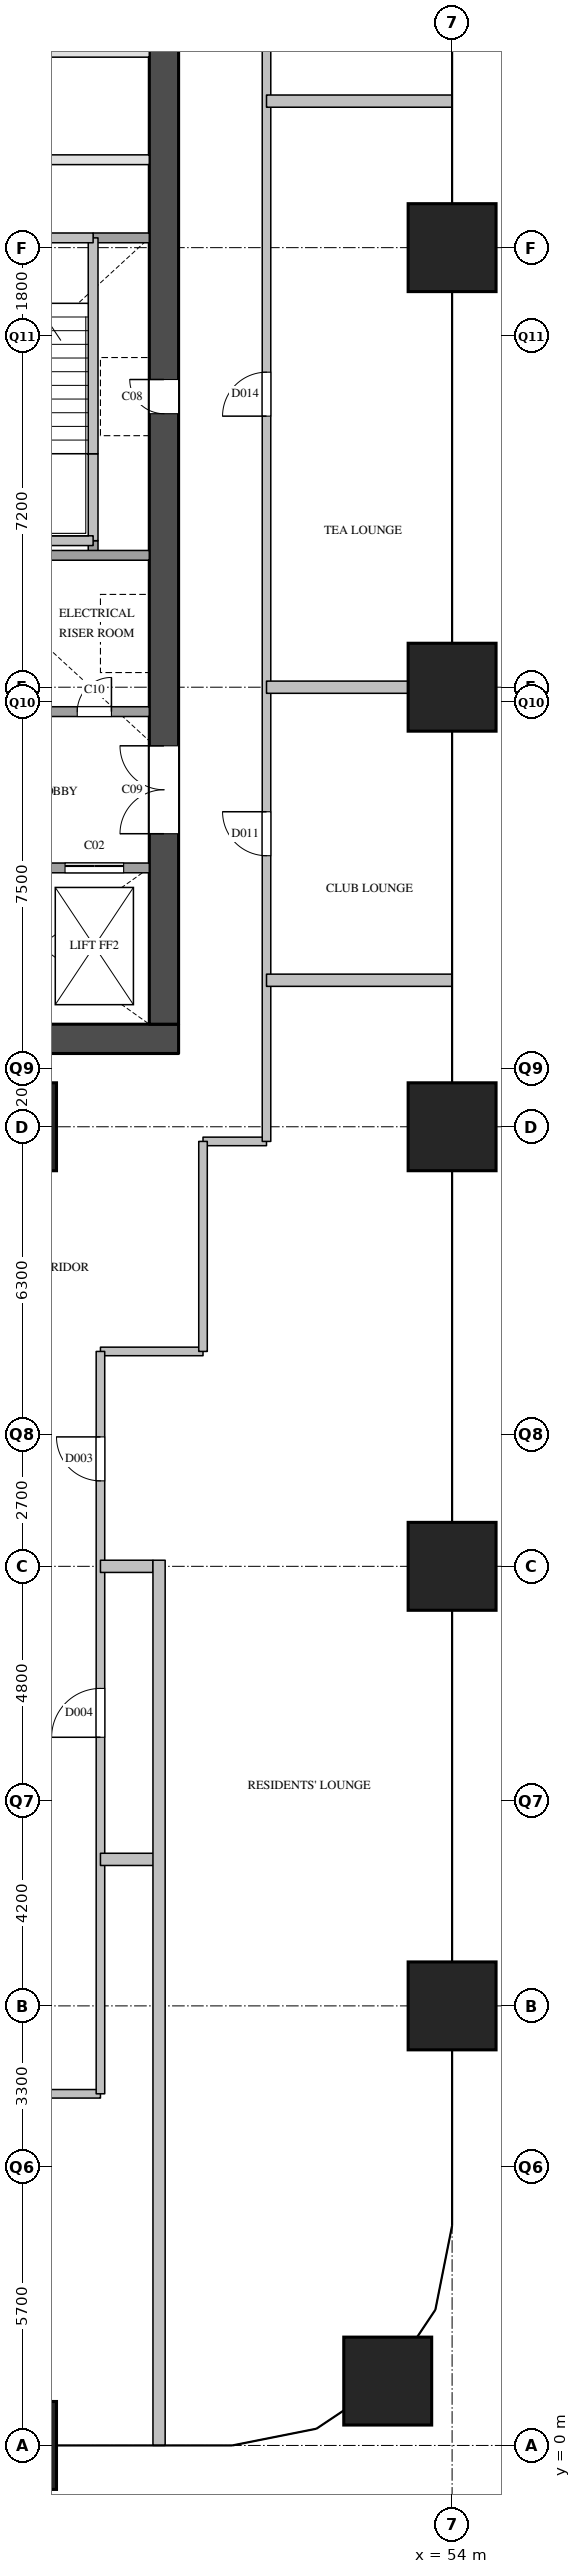
"""IFC4 building model, lengths in metres.
Left out: names, types, materials, properties, quantities, classifications, styles, units other than length and angle.
Written with IfcOpenShell. Run it as: python <this file> out.ifc"""

import sys

from ifc_helpers import new_model, si_unit, direction, frame, frame_2d, origin, origin_2d, place, context, subcontext, project, spatial, rectangle, extrude, element, fill, save


model = new_model("IFC4")
c1 = context("Model", 3, precision=1e-05, world=origin(), true_north=direction((0.0, 1.0)))
c2 = subcontext(c1, "Body", "Model", "MODEL_VIEW")
j1 = project(units=[si_unit("LENGTHUNIT", "METRE"), si_unit("PLANEANGLEUNIT", "RADIAN")], contexts=[c1])
p1 = place(None, origin())
s1 = spatial("IfcSite", under=j1, at=p1, CompositionType="ELEMENT")
p2 = place(p1, origin())
s2 = spatial("IfcBuilding", under=s1, at=p2, CompositionType="ELEMENT")
p3 = place(p2, frame((0.0, 0.0, 115.8)))
s3 = spatial("IfcBuildingStorey", under=s2, at=p3, CompositionType="ELEMENT", Elevation=115.8)
for number, where, z_axis, x_axis in (
    (1, (45.0, 0.0, 0.0), (0.0, 0.0, 1.0), (1.0, 0.0, 0.0)),
    (2, (45.0, 27.0, 0.0), (0.0, 0.0, 1.0), (1.0, 0.0, 0.0)),
    (3, (52.682, 1.318, 0.0), (0.0, 0.0, 1.0), (1.0, 0.0, 0.0)),
    (4, (54.0, 9.0, 0.0), (0.0, 0.0, 1.0), (1.0, 0.0, 0.0)),
    (5, (54.0, 18.0, 0.0), (0.0, 0.0, 1.0), (1.0, 0.0, 0.0)),
    (6, (54.0, 27.0, 0.0), (0.0, 0.0, 1.0), (1.0, 0.0, 0.0)),
    (7, (54.0, 36.0, 0.0), (0.0, 0.0, 1.0), (1.0, 0.0, 0.0)),
    (8, (54.0, 45.0, 0.0), (0.0, 0.0, 1.0), (1.0, 0.0, 0.0)),
):
    element("IfcColumn", number, at=place(p3, frame(where, z_axis=z_axis, x_axis=x_axis)), inside=s3, PredefinedType="COLUMN", context=c2, shape_type="SweptSolid", body=[
        extrude(rectangle(XDim=1.8, YDim=1.8, at=origin_2d()), origin(), (0.0, 0.0, 1.0), 3.8),
    ])
p4 = place(p3, frame((36.0, 28.8, 0.0), z_axis=(0.0, 0.0, 1.0), x_axis=(1.0, 0.0, 0.0)))
e9 = element("IfcWall", 9, at=p4, inside=s3, PredefinedType="SHEAR", context=c2, shape_type="SweptSolid", body=[
    extrude(rectangle(XDim=12.4, YDim=0.6, at=frame_2d((6.2, 0.0))), origin(), (0.0, 0.0, 1.0), 3.5),
])
p5 = place(p3, frame((48.1, 29.1, 0.0), z_axis=(0.0, 0.0, 1.0), x_axis=(0.0, 1.0, 0.0)))
e10 = element("IfcWall", 10, at=p5, inside=s3, PredefinedType="SHEAR", context=c2, shape_type="SweptSolid", body=[
    extrude(rectangle(XDim=20.3, YDim=0.6, at=frame_2d((10.15, 0.0))), origin(), (0.0, 0.0, 1.0), 3.5),
])
p6 = place(p5, frame((12.5, 0.0, 0.0)))
e11 = element("IfcOpeningElement", 11, at=p6, cuts=e10, PredefinedType="OPENING", context=c2, shape_type="SweptSolid", body=[
    extrude(rectangle(XDim=0.7, YDim=2.1, at=frame_2d((0.35, 1.05))), frame((0.0, 0.31, 0.0), z_axis=(0.0, -1.0, 0.0), x_axis=(1.0, 0.0, 0.0)), (0.0, 0.0, 1.0), 0.62),
])
p7 = place(p5, frame((3.9, 0.0, 0.0)))
e12 = element("IfcOpeningElement", 12, at=p7, cuts=e10, PredefinedType="OPENING", context=c2, shape_type="SweptSolid", body=[
    extrude(rectangle(XDim=1.8, YDim=2.1, at=frame_2d((0.9, 1.05))), frame((0.0, 0.31, 0.0), z_axis=(0.0, -1.0, 0.0), x_axis=(1.0, 0.0, 0.0)), (0.0, 0.0, 1.0), 0.62),
])
p8 = place(p3, frame((46.65, 38.7, 0.0), z_axis=(0.0, 0.0, 1.0), x_axis=(0.0, 1.0, 0.0)))
e13 = element("IfcWall", 13, at=p8, inside=s3, PredefinedType="SOLIDWALL", context=c2, shape_type="SweptSolid", body=[
    extrude(rectangle(XDim=0.3, YDim=0.2, at=frame_2d((0.15, 0.0))), origin(), (0.0, 0.0, 1.0), 3.5),
])
p9 = place(p3, frame((46.65, 39.0, 0.0), z_axis=(0.0, 0.0, 1.0), x_axis=(0.0, 1.0, 0.0)))
e14 = element("IfcWall", 14, at=p9, inside=s3, PredefinedType="SOLIDWALL", context=c2, shape_type="SweptSolid", body=[
    extrude(rectangle(XDim=1.78, YDim=0.2, at=frame_2d((0.89, 0.0))), origin(), (0.0, 0.0, 1.0), 3.5),
])
p10 = place(p3, frame((46.65, 40.78, 0.0), z_axis=(0.0, 0.0, 1.0), x_axis=(0.0, 1.0, 0.0)))
e15 = element("IfcWall", 15, at=p10, inside=s3, PredefinedType="SOLIDWALL", context=c2, shape_type="SweptSolid", body=[
    extrude(rectangle(XDim=4.42, YDim=0.2, at=frame_2d((2.21, 0.0))), origin(), (0.0, 0.0, 1.0), 3.5),
])
p11 = place(p3, frame((36.6, 32.3, 0.0), z_axis=(0.0, 0.0, 1.0), x_axis=(1.0, 0.0, 0.0)))
e16 = element("IfcWall", 16, at=p11, inside=s3, PredefinedType="SOLIDWALL", context=c2, shape_type="SweptSolid", body=[
    extrude(rectangle(XDim=11.2, YDim=0.2, at=frame_2d((5.6, 0.0))), origin(), (0.0, 0.0, 1.0), 3.5),
])
p12 = place(p11, frame((7.225, 0.0, 0.0)))
e17 = element("IfcOpeningElement", 17, at=p12, cuts=e16, PredefinedType="OPENING", context=c2, shape_type="SweptSolid", body=[
    extrude(rectangle(XDim=1.2, YDim=2.1, at=frame_2d((0.6, 1.05))), frame((0.0, 0.11, 0.0), z_axis=(0.0, -1.0, 0.0), x_axis=(1.0, 0.0, 0.0)), (0.0, 0.0, 1.0), 0.22),
])
p13 = place(p11, frame((9.475, 0.0, 0.0)))
e18 = element("IfcOpeningElement", 18, at=p13, cuts=e16, PredefinedType="OPENING", context=c2, shape_type="SweptSolid", body=[
    extrude(rectangle(XDim=1.2, YDim=2.1, at=frame_2d((0.6, 1.05))), frame((0.0, 0.11, 0.0), z_axis=(0.0, -1.0, 0.0), x_axis=(1.0, 0.0, 0.0)), (0.0, 0.0, 1.0), 0.22),
])
p14 = place(p3, frame((43.3, 35.5, 0.0), z_axis=(0.0, 0.0, 1.0), x_axis=(1.0, 0.0, 0.0)))
e19 = element("IfcWall", 19, at=p14, inside=s3, PredefinedType="SOLIDWALL", context=c2, shape_type="SweptSolid", body=[
    extrude(rectangle(XDim=4.5, YDim=0.2, at=frame_2d((2.25, 0.0))), origin(), (0.0, 0.0, 1.0), 3.5),
])
p15 = place(p14, frame((0.525, 0.0, 0.0)))
e20 = element("IfcOpeningElement", 20, at=p15, cuts=e19, PredefinedType="OPENING", context=c2, shape_type="SweptSolid", body=[
    extrude(rectangle(XDim=1.2, YDim=2.1, at=frame_2d((0.6, 1.05))), frame((0.0, 0.11, 0.0), z_axis=(0.0, -1.0, 0.0), x_axis=(1.0, 0.0, 0.0)), (0.0, 0.0, 1.0), 0.22),
])
p16 = place(p14, frame((3.025, 0.0, 0.0)))
e21 = element("IfcOpeningElement", 21, at=p16, cuts=e19, PredefinedType="OPENING", context=c2, shape_type="SweptSolid", body=[
    extrude(rectangle(XDim=0.7, YDim=2.1, at=frame_2d((0.35, 1.05))), frame((0.0, 0.11, 0.0), z_axis=(0.0, -1.0, 0.0), x_axis=(1.0, 0.0, 0.0)), (0.0, 0.0, 1.0), 0.22),
])
p17 = place(p3, frame((43.3, 38.7, 0.0), z_axis=(0.0, 0.0, 1.0), x_axis=(1.0, 0.0, 0.0)))
e22 = element("IfcWall", 22, at=p17, inside=s3, PredefinedType="SOLIDWALL", context=c2, shape_type="SweptSolid", body=[
    extrude(rectangle(XDim=4.5, YDim=0.2, at=frame_2d((2.25, 0.0))), origin(), (0.0, 0.0, 1.0), 3.5),
])
p18 = place(p3, frame((43.4, 39.0, 0.0), z_axis=(0.0, 0.0, 1.0), x_axis=(1.0, 0.0, 0.0)))
e23 = element("IfcWall", 23, at=p18, inside=s3, PredefinedType="SOLIDWALL", context=c2, shape_type="SweptSolid", body=[
    extrude(rectangle(XDim=3.25, YDim=0.2, at=frame_2d((1.625, 0.0))), origin(), (0.0, 0.0, 1.0), 3.5),
])
p19 = place(p3, frame((46.65, 45.2, 0.0), z_axis=(0.0, 0.0, 1.0), x_axis=(1.0, 0.0, 0.0)))
e24 = element("IfcWall", 24, at=p19, inside=s3, PredefinedType="SOLIDWALL", context=c2, shape_type="SweptSolid", body=[
    extrude(rectangle(XDim=1.15, YDim=0.2, at=frame_2d((0.575, 0.0))), origin(), (0.0, 0.0, 1.0), 3.5),
])
p20 = place(p3, frame((36.6, 45.2, 0.0), z_axis=(0.0, 0.0, 1.0), x_axis=(1.0, 0.0, 0.0)))
e25 = element("IfcWall", 25, at=p20, inside=s3, PredefinedType="SOLIDWALL", context=c2, shape_type="SweptSolid", body=[
    extrude(rectangle(XDim=10.05, YDim=0.2, at=frame_2d((5.025, 0.0))), origin(), (0.0, 0.0, 1.0), 3.5),
])
p21 = place(p20, frame((1.125, 0.0, 0.0)))
e26 = element("IfcOpeningElement", 26, at=p21, cuts=e25, PredefinedType="OPENING", context=c2, shape_type="SweptSolid", body=[
    extrude(rectangle(XDim=1.1, YDim=2.1, at=frame_2d((0.55, 1.05))), frame((0.0, 0.11, 0.0), z_axis=(0.0, -1.0, 0.0), x_axis=(1.0, 0.0, 0.0)), (0.0, 0.0, 1.0), 0.22),
])
p22 = place(p20, frame((4.475, 0.0, 0.0)))
e27 = element("IfcOpeningElement", 27, at=p22, cuts=e25, PredefinedType="OPENING", context=c2, shape_type="SweptSolid", body=[
    extrude(rectangle(XDim=1.1, YDim=2.1, at=frame_2d((0.55, 1.05))), frame((0.0, 0.11, 0.0), z_axis=(0.0, -1.0, 0.0), x_axis=(1.0, 0.0, 0.0)), (0.0, 0.0, 1.0), 0.22),
])
p23 = place(p20, frame((7.825, 0.0, 0.0)))
e28 = element("IfcOpeningElement", 28, at=p23, cuts=e25, PredefinedType="OPENING", context=c2, shape_type="SweptSolid", body=[
    extrude(rectangle(XDim=1.1, YDim=2.1, at=frame_2d((0.55, 1.05))), frame((0.0, 0.11, 0.0), z_axis=(0.0, -1.0, 0.0), x_axis=(1.0, 0.0, 0.0)), (0.0, 0.0, 1.0), 0.22),
])
p24 = place(p3, frame((36.6, 46.8, 0.0), z_axis=(0.0, 0.0, 1.0), x_axis=(1.0, 0.0, 0.0)))
e29 = element("IfcWall", 29, at=p24, inside=s3, PredefinedType="PARTITIONING", context=c2, shape_type="SweptSolid", body=[
    extrude(rectangle(XDim=11.2, YDim=0.2, at=frame_2d((5.6, 0.0))), origin(), (0.0, 0.0, 1.0), 3.5),
])
p25 = place(p24, frame((2.35, 0.0, 0.0)))
e30 = element("IfcOpeningElement", 30, at=p25, cuts=e29, PredefinedType="OPENING", context=c2, shape_type="SweptSolid", body=[
    extrude(rectangle(XDim=0.9, YDim=2.1, at=frame_2d((0.45, 1.05))), frame((0.0, 0.11, 0.0), z_axis=(0.0, -1.0, 0.0), x_axis=(1.0, 0.0, 0.0)), (0.0, 0.0, 1.0), 0.22),
])
p26 = place(p24, frame((7.95, 0.0, 0.0)))
e31 = element("IfcOpeningElement", 31, at=p26, cuts=e29, PredefinedType="OPENING", context=c2, shape_type="SweptSolid", body=[
    extrude(rectangle(XDim=0.9, YDim=2.1, at=frame_2d((0.45, 1.05))), frame((0.0, 0.11, 0.0), z_axis=(0.0, -1.0, 0.0), x_axis=(1.0, 0.0, 0.0)), (0.0, 0.0, 1.0), 0.22),
])
p27 = place(p3, frame((36.6, 49.0, 0.0), z_axis=(0.0, 0.0, 1.0), x_axis=(1.0, 0.0, 0.0)))
e32 = element("IfcWall", 32, at=p27, inside=s3, PredefinedType="PARTITIONING", context=c2, shape_type="SweptSolid", body=[
    extrude(rectangle(XDim=11.2, YDim=0.2, at=frame_2d((5.6, 0.0))), origin(), (0.0, 0.0, 1.0), 3.5),
])
p28 = place(p3, frame((34.2, 7.2, 0.0), z_axis=(0.0, 0.0, 1.0), x_axis=(1.0, 0.0, 0.0)))
e33 = element("IfcWall", 33, at=p28, inside=s3, PredefinedType="PARTITIONING", context=c2, shape_type="SweptSolid", body=[
    extrude(rectangle(XDim=12.6, YDim=0.175, at=frame_2d((6.3, 0.0))), origin(), (0.0, 0.0, 1.0), 3.5),
])
p29 = place(p28, frame((6.75, 0.0, 0.0)))
e34 = element("IfcOpeningElement", 34, at=p29, cuts=e33, PredefinedType="OPENING", context=c2, shape_type="SweptSolid", body=[
    extrude(rectangle(XDim=0.9, YDim=2.1, at=frame_2d((0.45, 1.05))), frame((0.0, 0.097, 0.0), z_axis=(0.0, -1.0, 0.0), x_axis=(1.0, 0.0, 0.0)), (0.0, 0.0, 1.0), 0.195),
])
p30 = place(p3, frame((46.8, 22.4, 0.0), z_axis=(0.0, 0.0, 1.0), x_axis=(1.0, 0.0, 0.0)))
e35 = element("IfcWall", 35, at=p30, inside=s3, PredefinedType="PARTITIONING", context=c2, shape_type="SweptSolid", body=[
    extrude(rectangle(XDim=2.1, YDim=0.175, at=frame_2d((1.05, 0.0))), origin(), (0.0, 0.0, 1.0), 3.5),
])
p31 = place(p3, frame((48.9, 26.7, 0.0), z_axis=(0.0, 0.0, 1.0), x_axis=(1.0, 0.0, 0.0)))
e36 = element("IfcWall", 36, at=p31, inside=s3, PredefinedType="PARTITIONING", context=c2, shape_type="SweptSolid", body=[
    extrude(rectangle(XDim=1.3, YDim=0.175, at=frame_2d((0.65, 0.0))), origin(), (0.0, 0.0, 1.0), 2.5),
])
p32 = place(p3, frame((46.8, 7.2, 0.0), z_axis=(0.0, 0.0, 1.0), x_axis=(0.0, 1.0, 0.0)))
e37 = element("IfcWall", 37, at=p32, inside=s3, PredefinedType="PARTITIONING", context=c2, shape_type="SweptSolid", body=[
    extrude(rectangle(XDim=15.2, YDim=0.175, at=frame_2d((7.6, 0.0))), origin(), (0.0, 0.0, 1.0), 3.5),
])
p33 = place(p32, frame((12.55, 0.0, 0.0)))
e38 = element("IfcOpeningElement", 38, at=p33, cuts=e37, PredefinedType="OPENING", context=c2, shape_type="SweptSolid", body=[
    extrude(rectangle(XDim=0.9, YDim=2.1, at=frame_2d((0.45, 1.05))), frame((0.0, 0.097, 0.0), z_axis=(0.0, -1.0, 0.0), x_axis=(1.0, 0.0, 0.0)), (0.0, 0.0, 1.0), 0.195),
])
p34 = place(p32, frame((7.3, 0.0, 0.0)))
e39 = element("IfcOpeningElement", 39, at=p34, cuts=e37, PredefinedType="OPENING", context=c2, shape_type="SweptSolid", body=[
    extrude(rectangle(XDim=1.0, YDim=2.1, at=frame_2d((0.5, 1.05))), frame((0.0, 0.097, 0.0), z_axis=(0.0, -1.0, 0.0), x_axis=(1.0, 0.0, 0.0)), (0.0, 0.0, 1.0), 0.195),
])
p35 = place(p3, frame((48.9, 22.4, 0.0), z_axis=(0.0, 0.0, 1.0), x_axis=(0.0, 1.0, 0.0)))
e40 = element("IfcWall", 40, at=p35, inside=s3, PredefinedType="PARTITIONING", context=c2, shape_type="SweptSolid", body=[
    extrude(rectangle(XDim=4.3, YDim=0.175, at=frame_2d((2.15, 0.0))), origin(), (0.0, 0.0, 1.0), 2.5),
])
p36 = place(p3, frame((50.2, 26.7, 0.0), z_axis=(0.0, 0.0, 1.0), x_axis=(0.0, 1.0, 0.0)))
e41 = element("IfcWall", 41, at=p36, inside=s3, PredefinedType="PARTITIONING", context=c2, shape_type="SweptSolid", body=[
    extrude(rectangle(XDim=25.1, YDim=0.175, at=frame_2d((12.55, 0.0))), origin(), (0.0, 0.0, 1.0), 2.5),
])
p37 = place(p36, frame((5.85, 0.0, 0.0)))
e42 = element("IfcOpeningElement", 42, at=p37, cuts=e41, PredefinedType="OPENING", context=c2, shape_type="SweptSolid", body=[
    extrude(rectangle(XDim=0.9, YDim=2.1, at=frame_2d((0.45, 1.05))), frame((0.0, 0.097, 0.0), z_axis=(0.0, -1.0, 0.0), x_axis=(1.0, 0.0, 0.0)), (0.0, 0.0, 1.0), 0.195),
])
p38 = place(p36, frame((14.85, 0.0, 0.0)))
e43 = element("IfcOpeningElement", 43, at=p38, cuts=e41, PredefinedType="OPENING", context=c2, shape_type="SweptSolid", body=[
    extrude(rectangle(XDim=0.9, YDim=2.1, at=frame_2d((0.45, 1.05))), frame((0.0, 0.097, 0.0), z_axis=(0.0, -1.0, 0.0), x_axis=(1.0, 0.0, 0.0)), (0.0, 0.0, 1.0), 0.195),
])
p39 = place(p36, frame((22.75, 0.0, 0.0)))
e44 = element("IfcOpeningElement", 44, at=p39, cuts=e41, PredefinedType="OPENING", context=c2, shape_type="SweptSolid", body=[
    extrude(rectangle(XDim=0.9, YDim=2.1, at=frame_2d((0.45, 1.05))), frame((0.0, 0.097, 0.0), z_axis=(0.0, -1.0, 0.0), x_axis=(1.0, 0.0, 0.0)), (0.0, 0.0, 1.0), 0.195),
])
p40 = place(p3, frame((46.8, 12.0, 0.0), z_axis=(0.0, 0.0, 1.0), x_axis=(1.0, 0.0, 0.0)))
e45 = element("IfcWall", 45, at=p40, inside=s3, PredefinedType="PARTITIONING", context=c2, shape_type="SweptSolid", body=[
    extrude(rectangle(XDim=1.2, YDim=0.25, at=frame_2d((0.6, 0.0))), origin(), (0.0, 0.0, 1.0), 3.5),
])
p41 = place(p3, frame((46.8, 18.0, 0.0), z_axis=(0.0, 0.0, 1.0), x_axis=(1.0, 0.0, 0.0)))
e46 = element("IfcWall", 46, at=p41, inside=s3, PredefinedType="PARTITIONING", context=c2, shape_type="SweptSolid", body=[
    extrude(rectangle(XDim=1.075, YDim=0.25, at=frame_2d((0.538, 0.0))), origin(), (0.0, 0.0, 1.0), 3.5),
])
p42 = place(p3, frame((50.2, 30.0, 0.0), z_axis=(0.0, 0.0, 1.0), x_axis=(1.0, 0.0, 0.0)))
e47 = element("IfcWall", 47, at=p42, inside=s3, PredefinedType="PARTITIONING", context=c2, shape_type="SweptSolid", body=[
    extrude(rectangle(XDim=3.8, YDim=0.25, at=frame_2d((1.9, 0.0))), origin(), (0.0, 0.0, 1.0), 2.5),
])
p43 = place(p3, frame((50.2, 36.0, 0.0), z_axis=(0.0, 0.0, 1.0), x_axis=(1.0, 0.0, 0.0)))
e48 = element("IfcWall", 48, at=p43, inside=s3, PredefinedType="PARTITIONING", context=c2, shape_type="SweptSolid", body=[
    extrude(rectangle(XDim=3.8, YDim=0.25, at=frame_2d((1.9, 0.0))), origin(), (0.0, 0.0, 1.0), 3.5),
])
p44 = place(p3, frame((50.2, 48.0, 0.0), z_axis=(0.0, 0.0, 1.0), x_axis=(1.0, 0.0, 0.0)))
e49 = element("IfcWall", 49, at=p44, inside=s3, PredefinedType="PARTITIONING", context=c2, shape_type="SweptSolid", body=[
    extrude(rectangle(XDim=3.8, YDim=0.25, at=frame_2d((1.9, 0.0))), origin(), (0.0, 0.0, 1.0), 2.5),
])
p45 = place(p3, frame((48.0, 0.0, 0.0), z_axis=(0.0, 0.0, 1.0), x_axis=(0.0, 1.0, 0.0)))
e50 = element("IfcWall", 50, at=p45, inside=s3, PredefinedType="PARTITIONING", context=c2, shape_type="SweptSolid", body=[
    extrude(rectangle(XDim=18.125, YDim=0.25, at=frame_2d((9.062, 0.0))), origin(), (0.0, 0.0, 1.0), 2.5),
])
p46 = place(p13, origin())
e51 = element("IfcDoor", 51, at=p46, inside=s3, OperationType="SLIDING_TO_LEFT", PredefinedType="DOOR", context=c2, shape_type="SweptSolid", body=[
    extrude(rectangle(XDim=1.2, YDim=2.1, at=frame_2d((0.6, 1.05))), frame((0.0, 0.025, 0.0), z_axis=(0.0, -1.0, 0.0), x_axis=(1.0, 0.0, 0.0)), (0.0, 0.0, 1.0), 0.05),
])
fill(e18, e51)
p47 = place(p6, origin())
e52 = element("IfcDoor", 52, at=p47, inside=s3, OperationType="SINGLE_SWING_RIGHT", PredefinedType="DOOR", context=c2, shape_type="SweptSolid", body=[
    extrude(rectangle(XDim=0.7, YDim=2.1, at=frame_2d((0.35, 1.05))), frame((0.0, 0.025, 0.0), z_axis=(0.0, -1.0, 0.0), x_axis=(1.0, 0.0, 0.0)), (0.0, 0.0, 1.0), 0.05),
])
fill(e11, e52)
p48 = place(p7, origin())
e53 = element("IfcDoor", 53, at=p48, inside=s3, OperationType="DOUBLE_DOOR_SINGLE_SWING", PredefinedType="DOOR", context=c2, shape_type="SweptSolid", body=[
    extrude(rectangle(XDim=1.8, YDim=2.1, at=frame_2d((0.9, 1.05))), frame((0.0, 0.025, 0.0), z_axis=(0.0, -1.0, 0.0), x_axis=(1.0, 0.0, 0.0)), (0.0, 0.0, 1.0), 0.05),
])
fill(e12, e53)
p49 = place(p16, origin())
e54 = element("IfcDoor", 54, at=p49, inside=s3, OperationType="SINGLE_SWING_RIGHT", PredefinedType="DOOR", context=c2, shape_type="SweptSolid", body=[
    extrude(rectangle(XDim=0.7, YDim=2.1, at=frame_2d((0.35, 1.05))), frame((0.0, 0.025, 0.0), z_axis=(0.0, -1.0, 0.0), x_axis=(1.0, 0.0, 0.0)), (0.0, 0.0, 1.0), 0.05),
])
fill(e21, e54)
p50 = place(p33, origin())
e55 = element("IfcDoor", 55, at=p50, inside=s3, OperationType="SINGLE_SWING_RIGHT", PredefinedType="DOOR", context=c2, shape_type="SweptSolid", body=[
    extrude(rectangle(XDim=0.9, YDim=2.1, at=frame_2d((0.45, 1.05))), frame((0.0, 0.025, 0.0), z_axis=(0.0, -1.0, 0.0), x_axis=(1.0, 0.0, 0.0)), (0.0, 0.0, 1.0), 0.05),
])
fill(e38, e55)
p51 = place(p34, origin())
e56 = element("IfcDoor", 56, at=p51, inside=s3, OperationType="SINGLE_SWING_LEFT", PredefinedType="DOOR", context=c2, shape_type="SweptSolid", body=[
    extrude(rectangle(XDim=1.0, YDim=2.1, at=frame_2d((0.5, 1.05))), frame((0.0, 0.025, 0.0), z_axis=(0.0, -1.0, 0.0), x_axis=(1.0, 0.0, 0.0)), (0.0, 0.0, 1.0), 0.05),
])
fill(e39, e56)
p52 = place(p37, origin())
e57 = element("IfcDoor", 57, at=p52, inside=s3, OperationType="SINGLE_SWING_RIGHT", PredefinedType="DOOR", context=c2, shape_type="SweptSolid", body=[
    extrude(rectangle(XDim=0.9, YDim=2.1, at=frame_2d((0.45, 1.05))), frame((0.0, 0.025, 0.0), z_axis=(0.0, -1.0, 0.0), x_axis=(1.0, 0.0, 0.0)), (0.0, 0.0, 1.0), 0.05),
])
fill(e42, e57)
p53 = place(p38, origin())
e58 = element("IfcDoor", 58, at=p53, inside=s3, OperationType="SINGLE_SWING_LEFT", PredefinedType="DOOR", context=c2, shape_type="SweptSolid", body=[
    extrude(rectangle(XDim=0.9, YDim=2.1, at=frame_2d((0.45, 1.05))), frame((0.0, 0.025, 0.0), z_axis=(0.0, -1.0, 0.0), x_axis=(1.0, 0.0, 0.0)), (0.0, 0.0, 1.0), 0.05),
])
fill(e43, e58)
save(model, sys.argv[1])
